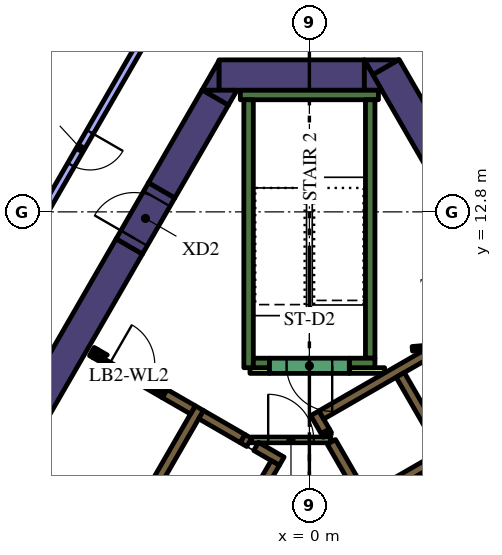
"""IFC4 building model, lengths in metres.
Left out: names, types, materials, properties, quantities, classifications, styles, units other than length and angle.
Written with IfcOpenShell. Run it as: python <this file> out.ifc"""

import sys

from ifc_helpers import new_model, si_unit, direction, frame, frame_2d, origin, place, context, subcontext, project, spatial, polyline, rectangle, outline, extrude, element, fill, save


model = new_model("IFC4")
c1 = context("Model", 3, precision=1e-05, world=origin(), true_north=direction((0.0, 1.0)))
c2 = subcontext(c1, "Body", "Model", "MODEL_VIEW")
j1 = project(units=[si_unit("LENGTHUNIT", "METRE"), si_unit("PLANEANGLEUNIT", "RADIAN")], contexts=[c1])
p1 = place(None, origin())
s1 = spatial("IfcSite", under=j1, at=p1, CompositionType="ELEMENT")
p2 = place(p1, origin())
s2 = spatial("IfcBuilding", under=s1, at=p2, CompositionType="ELEMENT")
p3 = place(p2, frame((0.0, 0.0, 158.4)))
s3 = spatial("IfcBuildingStorey", under=s2, at=p3, CompositionType="ELEMENT", Elevation=158.4)
p4 = place(p3, frame((8.279, 5.761, 0.0), z_axis=(0.0, 0.0, 1.0), x_axis=(-0.500010359015, 0.866019422922, 0.0)))
e1 = element("IfcWall", 1, at=p4, inside=s3, PredefinedType="SOLIDWALL", context=c2, shape_type="SweptSolid", body=[
    extrude(rectangle(XDim=12.528, YDim=0.8, at=frame_2d((6.264, 0.0))), origin(), (0.0, 0.0, 1.0), 4.2),
])
p5 = place(p3, origin())
e2 = element("IfcWall", 2, at=p5, inside=s3, PredefinedType="SOLIDWALL", context=c2, shape_type="SweptSolid", body=[
    extrude(outline(polyline([(1.443, 16.8), (2.339, 16.8), (1.667, 16.412), (1.443, 16.8)])), origin(), (0.0, 0.0, 1.0), 4.2),
])
p6 = place(p3, frame((-2.379, 16.4, 0.0), z_axis=(0.0, 0.0, 1.0), x_axis=(1.0, 0.0, 0.0)))
e3 = element("IfcWall", 3, at=p6, inside=s3, PredefinedType="SOLIDWALL", context=c2, shape_type="SweptSolid", body=[
    extrude(rectangle(XDim=3.824, YDim=0.8, at=frame_2d((1.912, 0.0))), origin(), (0.0, 0.0, 1.0), 4.2),
])
e4 = element("IfcWall", 4, at=p5, inside=s3, PredefinedType="SOLIDWALL", context=c2, shape_type="SweptSolid", body=[
    extrude(outline(polyline([(1.905, 16.0), (1.447, 16.0), (1.447, 16.793), (1.905, 16.0)])), origin(), (0.0, 0.0, 1.0), 4.2),
])
e5 = element("IfcWall", 5, at=p5, inside=s3, PredefinedType="SOLIDWALL", context=c2, shape_type="SweptSolid", body=[
    extrude(outline(polyline([(-2.829, 16.0), (-2.381, 16.776), (-2.381, 16.0), (-2.829, 16.0)])), origin(), (0.0, 0.0, 1.0), 4.2),
])
p7 = place(p3, frame((-2.477, 15.81, 0.0), z_axis=(0.0, 0.0, 1.0), x_axis=(-0.499969377405, -0.866043083026, 0.0)))
e6 = element("IfcWall", 6, at=p7, inside=s3, PredefinedType="SOLIDWALL", context=c2, shape_type="SweptSolid", body=[
    extrude(rectangle(XDim=2.824, YDim=0.8, at=frame_2d((1.412, 0.0))), origin(), (0.0, 0.0, 1.0), 4.2),
])
e7 = element("IfcWall", 7, at=p5, inside=s3, PredefinedType="SOLIDWALL", context=c2, shape_type="SweptSolid", body=[
    extrude(outline(polyline([(-1.905, 16.0), (-2.129, 15.612), (-2.801, 16.0), (-1.905, 16.0)])), origin(), (0.0, 0.0, 1.0), 4.2),
])
p8 = place(p3, frame((-12.668, -1.842, 0.0), z_axis=(0.0, 0.0, 1.0), x_axis=(0.500003640647, 0.866023301845, 0.0)))
e8 = element("IfcWall", 8, at=p8, inside=s3, PredefinedType="SOLIDWALL", context=c2, shape_type="SweptSolid", body=[
    extrude(rectangle(XDim=15.858, YDim=0.8, at=frame_2d((7.929, 0.0))), origin(), (0.0, 0.0, 1.0), 4.2),
])
p9 = place(p3, frame((-1.817, 15.875, 0.0), z_axis=(0.0, 0.0, 1.0), x_axis=(1.0, 0.0, 0.0)))
e9 = element("IfcWall", 9, at=p9, inside=s3, PredefinedType="SOLIDWALL", context=c2, shape_type="SweptSolid", body=[
    extrude(rectangle(XDim=3.634, YDim=0.25, at=frame_2d((1.817, 0.0))), origin(), (0.0, 0.0, 1.0), 4.2),
])
p10 = place(p3, frame((1.6, 8.95, 0.0), z_axis=(0.0, 0.0, 1.0), x_axis=(0.0, 1.0, 0.0)))
e10 = element("IfcWall", 10, at=p10, inside=s3, PredefinedType="SOLIDWALL", context=c2, shape_type="SweptSolid", body=[
    extrude(rectangle(XDim=6.8, YDim=0.25, at=frame_2d((3.4, 0.0))), origin(), (0.0, 0.0, 1.0), 4.2),
])
p11 = place(p3, frame((1.05, 8.825, 0.0), z_axis=(0.0, 0.0, 1.0), x_axis=(1.0, 0.0, 0.0)))
e11 = element("IfcWall", 11, at=p11, inside=s3, PredefinedType="SOLIDWALL", context=c2, shape_type="SweptSolid", body=[
    extrude(rectangle(XDim=0.675, YDim=0.25, at=frame_2d((0.337, 0.0))), origin(), (0.0, 0.0, 1.0), 4.2),
])
p12 = place(p3, frame((-1.6, 8.7, 0.0), z_axis=(0.0, 0.0, 1.0), x_axis=(0.0, 1.0, 0.0)))
e12 = element("IfcWall", 12, at=p12, inside=s3, PredefinedType="SOLIDWALL", context=c2, shape_type="SweptSolid", body=[
    extrude(rectangle(XDim=7.05, YDim=0.25, at=frame_2d((3.525, 0.0))), origin(), (0.0, 0.0, 1.0), 4.2),
])
p13 = place(p3, frame((-1.475, 8.825, 0.0), z_axis=(0.0, 0.0, 1.0), x_axis=(1.0, 0.0, 0.0)))
e13 = element("IfcWall", 13, at=p13, inside=s3, PredefinedType="SOLIDWALL", context=c2, shape_type="SweptSolid", body=[
    extrude(rectangle(XDim=0.425, YDim=0.25, at=frame_2d((0.212, 0.0))), origin(), (0.0, 0.0, 1.0), 4.2),
])
p14 = place(p3, frame((0.473, 6.93, 0.0), z_axis=(0.0, 0.0, 1.0), x_axis=(-0.49972245349, 0.866185586049, 0.0)))
e14 = element("IfcWall", 14, at=p14, inside=s3, PredefinedType="SOLIDWALL", context=c2, shape_type="SweptSolid", body=[
    extrude(rectangle(XDim=0.11, YDim=0.25, at=frame_2d((0.055, 0.0))), origin(), (0.0, 0.0, 1.0), 4.2),
])
p15 = place(p3, frame((6.568, -3.627, 0.0), z_axis=(0.0, 0.0, 1.0), x_axis=(-0.499999455981, 0.866025717874, 0.0)))
e15 = element("IfcWall", 15, at=p15, inside=s3, PredefinedType="SOLIDWALL", context=c2, shape_type="SweptSolid", body=[
    extrude(rectangle(XDim=11.978, YDim=0.25, at=frame_2d((5.989, 0.0))), origin(), (0.0, 0.0, 1.0), 4.2),
])
p16 = place(p3, frame((0.417, 7.027, 0.0), z_axis=(0.0, 0.0, 1.0), x_axis=(-0.500210807569, 0.865903659763, 0.0)))
e16 = element("IfcWall", 16, at=p16, inside=s3, PredefinedType="SOLIDWALL", context=c2, shape_type="SweptSolid", body=[
    extrude(rectangle(XDim=0.548, YDim=0.25, at=frame_2d((0.274, 0.0))), origin(), (0.0, 0.0, 1.0), 4.2),
])
p17 = place(p3, frame((3.1, 9.064, 0.0), z_axis=(0.0, 0.0, 1.0), x_axis=(-0.866030133475, -0.499991807846, 0.0)))
e17 = element("IfcWall", 17, at=p17, inside=s3, PredefinedType="SOLIDWALL", context=c2, shape_type="SweptSolid", body=[
    extrude(rectangle(XDim=3.217, YDim=0.25, at=frame_2d((1.608, 0.0))), origin(), (0.0, 0.0, 1.0), 4.2),
])
p18 = place(p3, frame((1.574, 5.274, 0.0), z_axis=(0.0, 0.0, 1.0), x_axis=(0.866028486751, 0.499994660107, 0.0)))
e18 = element("IfcWall", 18, at=p18, inside=s3, PredefinedType="SOLIDWALL", context=c2, shape_type="SweptSolid", body=[
    extrude(rectangle(XDim=2.2, YDim=0.25, at=frame_2d((1.1, 0.0))), origin(), (0.0, 0.0, 1.0), 4.2),
])
p19 = place(p3, frame((-8.06, -1.311, 0.0), z_axis=(0.0, 0.0, 1.0), x_axis=(0.50000273126, 0.866023826885, 0.0)))
e19 = element("IfcWall", 19, at=p19, inside=s3, PredefinedType="SOLIDWALL", context=c2, shape_type="SweptSolid", body=[
    extrude(rectangle(XDim=10.33, YDim=0.25, at=frame_2d((5.165, 0.0))), origin(), (0.0, 0.0, 1.0), 4.2),
])
p20 = place(p3, frame((-1.758, 6.835, 0.0), z_axis=(0.0, 0.0, 1.0), x_axis=(0.865982457891, -0.500074377092, 0.0)))
e20 = element("IfcWall", 20, at=p20, inside=s3, PredefinedType="SOLIDWALL", context=c2, shape_type="SweptSolid", body=[
    extrude(rectangle(XDim=0.2, YDim=0.25, at=frame_2d((0.1, 0.0))), origin(), (0.0, 0.0, 1.0), 4.2),
])
p21 = place(p3, frame((-1.76, 6.836, 0.0), z_axis=(0.0, 0.0, 1.0), x_axis=(-0.865952863304, 0.500125622755, 0.0)))
e21 = element("IfcWall", 21, at=p21, inside=s3, PredefinedType="SOLIDWALL", context=c2, shape_type="SweptSolid", body=[
    extrude(rectangle(XDim=1.258, YDim=0.25, at=frame_2d((0.629, 0.0))), origin(), (0.0, 0.0, 1.0), 4.2),
])
p22 = place(p3, frame((-0.728, 6.24, 0.0), z_axis=(0.0, 0.0, 1.0), x_axis=(-0.865955664968, 0.500120771724, 0.0)))
e22 = element("IfcWall", 22, at=p22, inside=s3, PredefinedType="SOLIDWALL", context=c2, shape_type="SweptSolid", body=[
    extrude(rectangle(XDim=0.778, YDim=0.25, at=frame_2d((0.389, 0.0))), origin(), (0.0, 0.0, 1.0), 4.2),
])
p23 = place(p3, frame((-5.725, 9.125, 0.0), z_axis=(0.0, 0.0, 1.0), x_axis=(0.866185586049, -0.49972245349, 0.0)))
e23 = element("IfcWall", 23, at=p23, inside=s3, PredefinedType="SOLIDWALL", context=c2, shape_type="SweptSolid", body=[
    extrude(rectangle(XDim=0.11, YDim=0.25, at=frame_2d((0.055, 0.0))), origin(), (0.0, 0.0, 1.0), 4.2),
])
p24 = place(p3, frame((-3.066, 7.59, 0.0), z_axis=(0.0, 0.0, 1.0), x_axis=(-0.866081358704, 0.49990307071, 0.0)))
e24 = element("IfcWall", 24, at=p24, inside=s3, PredefinedType="SOLIDWALL", context=c2, shape_type="SweptSolid", body=[
    extrude(rectangle(XDim=0.858, YDim=0.25, at=frame_2d((0.429, 0.0))), origin(), (0.0, 0.0, 1.0), 4.2),
])
e25 = element("IfcWall", 25, at=p5, inside=s3, PredefinedType="SOLIDWALL", context=c2, shape_type="SweptSolid", body=[
    extrude(outline(polyline([(-3.748, 8.128), (-3.813, 8.015), (-4.027, 8.139), (-4.017, 8.156), (-4.008, 8.173), (-4.0, 8.192), (-3.995, 8.21), (-3.991, 8.23), (-3.99, 8.25), (-3.99, 8.268), (-3.748, 8.128)])), origin(), (0.0, 0.0, 1.0), 4.2),
])
e26 = element("IfcWall", 26, at=p5, inside=s3, PredefinedType="SOLIDWALL", context=c2, shape_type="SweptSolid", body=[
    extrude(outline(polyline([(-5.689, 8.96), (-5.69, 8.961), (-5.565, 9.177), (-5.319, 9.035), (-5.335, 9.026), (-5.351, 9.015), (-5.366, 9.002), (-5.379, 8.988), (-5.392, 8.972), (-5.402, 8.956), (-5.412, 8.939), (-5.629, 9.064), (-5.629, 9.064), (-5.689, 8.96)])), origin(), (0.0, 0.0, 1.0), 4.2),
])
p25 = place(p3, frame((1.05, 8.625, 0.0), z_axis=(0.0, 0.0, 1.0), x_axis=(1.0, 0.0, 0.0)))
e27 = element("IfcWall", 27, at=p25, inside=s3, PredefinedType="PARTITIONING", context=c2, shape_type="SweptSolid", body=[
    extrude(rectangle(XDim=0.929, YDim=0.15, at=frame_2d((0.464, 0.0))), origin(), (0.0, 0.0, 1.0), 3.15),
])
p26 = place(p3, frame((-1.564, 8.625, 0.0), z_axis=(0.0, 0.0, 1.0), x_axis=(1.0, 0.0, 0.0)))
e28 = element("IfcWall", 28, at=p26, inside=s3, PredefinedType="PARTITIONING", context=c2, shape_type="SweptSolid", body=[
    extrude(rectangle(XDim=0.514, YDim=0.15, at=frame_2d((0.257, 0.0))), origin(), (0.0, 0.0, 1.0), 3.15),
])
p27 = place(p3, frame((8.565, -2.185, 0.0), z_axis=(0.0, 0.0, 1.0), x_axis=(-0.499997954832, 0.866026584559, 0.0)))
e29 = element("IfcWall", 29, at=p27, inside=s3, PredefinedType="SOLIDWALL", context=c2, shape_type="SweptSolid", body=[
    extrude(rectangle(XDim=12.35, YDim=0.25, at=frame_2d((6.175, 0.0))), origin(), (0.0, 0.0, 1.0), 4.2),
])
p28 = place(p27, frame((0.585, 0.0, 0.0)))
e30 = element("IfcOpeningElement", 30, at=p28, cuts=e29, PredefinedType="OPENING", context=c2, shape_type="SweptSolid", body=[
    extrude(rectangle(XDim=1.1, YDim=2.1, at=frame_2d((0.55, 1.05))), frame((0.0, 0.135, 0.0), z_axis=(0.0, -1.0, 0.0), x_axis=(1.0, 0.0, 0.0)), (0.0, 0.0, 1.0), 0.27),
])
p29 = place(p3, frame((-0.898, 6.194, 0.0), z_axis=(0.0, 0.0, 1.0), x_axis=(-0.499996202215, -0.866027596426, 0.0)))
e31 = element("IfcWall", 31, at=p29, inside=s3, PredefinedType="SOLIDWALL", context=c2, shape_type="SweptSolid", body=[
    extrude(rectangle(XDim=9.83, YDim=0.25, at=frame_2d((4.915, 0.0))), origin(), (0.0, 0.0, 1.0), 4.2),
])
p30 = place(p29, frame((0.585, 0.0, 0.0)))
e32 = element("IfcOpeningElement", 32, at=p30, cuts=e31, PredefinedType="OPENING", context=c2, shape_type="SweptSolid", body=[
    extrude(rectangle(XDim=1.1, YDim=2.1, at=frame_2d((0.55, 1.05))), frame((0.0, 0.135, 0.0), z_axis=(0.0, -1.0, 0.0), x_axis=(1.0, 0.0, 0.0)), (0.0, 0.0, 1.0), 0.27),
])
p31 = place(p29, frame((3.105, 0.0, 0.0)))
e33 = element("IfcOpeningElement", 33, at=p31, cuts=e31, PredefinedType="OPENING", context=c2, shape_type="SweptSolid", body=[
    extrude(rectangle(XDim=1.1, YDim=2.1, at=frame_2d((0.55, 1.05))), frame((0.0, 0.135, 0.0), z_axis=(0.0, -1.0, 0.0), x_axis=(1.0, 0.0, 0.0)), (0.0, 0.0, 1.0), 0.27),
])
p32 = place(p29, frame((5.625, 0.0, 0.0)))
e34 = element("IfcOpeningElement", 34, at=p32, cuts=e31, PredefinedType="OPENING", context=c2, shape_type="SweptSolid", body=[
    extrude(rectangle(XDim=1.1, YDim=2.1, at=frame_2d((0.55, 1.05))), frame((0.0, 0.135, 0.0), z_axis=(0.0, -1.0, 0.0), x_axis=(1.0, 0.0, 0.0)), (0.0, 0.0, 1.0), 0.27),
])
p33 = place(p29, frame((8.145, 0.0, 0.0)))
e35 = element("IfcOpeningElement", 35, at=p33, cuts=e31, PredefinedType="OPENING", context=c2, shape_type="SweptSolid", body=[
    extrude(rectangle(XDim=1.1, YDim=2.1, at=frame_2d((0.55, 1.05))), frame((0.0, 0.135, 0.0), z_axis=(0.0, -1.0, 0.0), x_axis=(1.0, 0.0, 0.0)), (0.0, 0.0, 1.0), 0.27),
])
p34 = place(p3, frame((1.05, 8.75, 0.0), z_axis=(0.0, 0.0, 1.0), x_axis=(-1.0, 0.0, 0.0)))
e36 = element("IfcWall", 36, at=p34, inside=s3, PredefinedType="SOLIDWALL", context=c2, shape_type="SweptSolid", body=[
    extrude(rectangle(XDim=2.1, YDim=0.4, at=frame_2d((1.05, 0.0))), origin(), (0.0, 0.0, 1.0), 4.2),
])
p35 = place(p34, frame((0.45, 0.0, 0.0)))
e37 = element("IfcOpeningElement", 37, at=p35, cuts=e36, PredefinedType="OPENING", context=c2, shape_type="SweptSolid", body=[
    extrude(rectangle(XDim=1.2, YDim=2.1, at=frame_2d((0.6, 1.05))), frame((0.0, 0.21, 0.0), z_axis=(0.0, -1.0, 0.0), x_axis=(1.0, 0.0, 0.0)), (0.0, 0.0, 1.0), 0.42),
])
p36 = place(p3, frame((5.398, 9.419, 0.0), z_axis=(0.0, 0.0, 1.0), x_axis=(-0.996653416376, -0.081743303248, 0.0)))
e38 = element("IfcWall", 38, at=p36, inside=s3, PredefinedType="PARTITIONING", context=c2, shape_type="SweptSolid", body=[
    extrude(rectangle(XDim=2.7, YDim=0.12, at=frame_2d((1.35, 0.0))), origin(), (0.0, 0.0, 1.0), 3.15),
])
p37 = place(p36, frame((1.45, 0.0, 0.0)))
e39 = element("IfcOpeningElement", 39, at=p37, cuts=e38, PredefinedType="OPENING", context=c2, shape_type="SweptSolid", body=[
    extrude(rectangle(XDim=0.9, YDim=2.1, at=frame_2d((0.45, 1.05))), frame((0.0, 0.07, 0.0), z_axis=(0.0, -1.0, 0.0), x_axis=(1.0, 0.0, 0.0)), (0.0, 0.0, 1.0), 0.14),
])
p38 = place(p3, frame((-1.534, 6.8, 0.0), z_axis=(0.0, 0.0, 1.0), x_axis=(1.0, 0.0, 0.0)))
e40 = element("IfcWall", 40, at=p38, inside=s3, PredefinedType="PARTITIONING", context=c2, shape_type="SweptSolid", body=[
    extrude(rectangle(XDim=2.1, YDim=0.15, at=frame_2d((1.05, 0.0))), origin(), (0.0, 0.0, 1.0), 3.15),
])
p39 = place(p38, frame((0.45, 0.0, 0.0)))
e41 = element("IfcOpeningElement", 41, at=p39, cuts=e40, PredefinedType="OPENING", context=c2, shape_type="SweptSolid", body=[
    extrude(rectangle(XDim=1.2, YDim=2.1, at=frame_2d((0.6, 1.05))), frame((0.0, 0.085, 0.0), z_axis=(0.0, -1.0, 0.0), x_axis=(1.0, 0.0, 0.0)), (0.0, 0.0, 1.0), 0.17),
])
p40 = place(p3, frame((-5.659, 9.012, 0.0), z_axis=(0.0, 0.0, 1.0), x_axis=(0.866009402589, -0.500027713859, 0.0)))
e42 = element("IfcWall", 42, at=p40, inside=s3, PredefinedType="PARTITIONING", context=c2, shape_type="SweptSolid", body=[
    extrude(rectangle(XDim=2.1, YDim=0.12, at=frame_2d((1.05, 0.0))), origin(), (0.0, 0.0, 1.0), 3.15),
])
p41 = place(p40, frame((0.45, 0.0, 0.0)))
e43 = element("IfcOpeningElement", 43, at=p41, cuts=e42, PredefinedType="OPENING", context=c2, shape_type="SweptSolid", body=[
    extrude(rectangle(XDim=1.2, YDim=2.1, at=frame_2d((0.6, 1.05))), frame((0.0, 0.07, 0.0), z_axis=(0.0, -1.0, 0.0), x_axis=(1.0, 0.0, 0.0)), (0.0, 0.0, 1.0), 0.14),
])
p42 = place(p3, frame((-4.739, 11.892, 0.0), z_axis=(0.0, 0.0, 1.0), x_axis=(0.500062241894, 0.865989465428, 0.0)))
e44 = element("IfcWall", 44, at=p42, inside=s3, PredefinedType="SOLIDWALL", context=c2, shape_type="SweptSolid", body=[
    extrude(rectangle(XDim=1.7, YDim=0.8, at=frame_2d((0.85, 0.0))), origin(), (0.0, 0.0, 1.0), 4.2),
])
p43 = place(p42, frame((0.25, 0.0, 0.0)))
e45 = element("IfcOpeningElement", 45, at=p43, cuts=e44, PredefinedType="OPENING", context=c2, shape_type="SweptSolid", body=[
    extrude(rectangle(XDim=1.2, YDim=2.1, at=frame_2d((0.6, 1.05))), frame((0.0, 0.41, 0.0), z_axis=(0.0, -1.0, 0.0), x_axis=(1.0, 0.0, 0.0)), (0.0, 0.0, 1.0), 0.82),
])
p44 = place(p3, frame((-9.322, 16.573, 0.0), z_axis=(0.0, 0.0, 1.0), x_axis=(0.551906048292, 0.833906298009, 0.0)))
e46 = element("IfcWall", 46, at=p44, inside=s3, PredefinedType="PARTITIONING", context=c2, shape_type="SweptSolid", body=[
    extrude(rectangle(XDim=5.995, YDim=0.15, at=frame_2d((2.998, 0.0))), origin(), (0.0, 0.0, 1.0), 3.15),
])
p45 = place(p44, frame((2.595, 0.0, 0.0)))
e47 = element("IfcOpeningElement", 47, at=p45, cuts=e46, PredefinedType="OPENING", context=c2, shape_type="SweptSolid", body=[
    extrude(rectangle(XDim=0.9, YDim=2.1, at=frame_2d((0.45, 1.05))), frame((0.0, 0.085, 0.0), z_axis=(0.0, -1.0, 0.0), x_axis=(1.0, 0.0, 0.0)), (0.0, 0.0, 1.0), 0.17),
])
p46 = place(p3, frame((-3.522, 18.8, 0.0), z_axis=(0.0, 0.0, 1.0), x_axis=(-0.500015783377, -0.866016291056, 0.0)))
e48 = element("IfcWall", 48, at=p46, inside=s3, PredefinedType="PARTITIONING", context=c2, shape_type="SweptSolid", body=[
    extrude(rectangle(XDim=9.99, YDim=0.2, at=frame_2d((4.995, 0.0))), origin(), (0.0, 0.0, 1.0), 3.15),
])
p47 = place(p46, frame((4.5, 0.0, 0.0)))
e49 = element("IfcOpeningElement", 49, at=p47, cuts=e48, PredefinedType="OPENING", context=c2, shape_type="SweptSolid", body=[
    extrude(rectangle(XDim=1.0, YDim=2.1, at=frame_2d((0.5, 1.05))), frame((0.0, 0.11, 0.0), z_axis=(0.0, -1.0, 0.0), x_axis=(1.0, 0.0, 0.0)), (0.0, 0.0, 1.0), 0.22),
])
p48 = place(p35, origin())
e50 = element("IfcDoor", 50, at=p48, inside=s3, OperationType="SINGLE_SWING_LEFT", PredefinedType="DOOR", context=c2, shape_type="SweptSolid", body=[
    extrude(rectangle(XDim=1.2, YDim=2.1, at=frame_2d((0.6, 1.05))), frame((0.0, 0.025, 0.0), z_axis=(0.0, -1.0, 0.0), x_axis=(1.0, 0.0, 0.0)), (0.0, 0.0, 1.0), 0.05),
])
fill(e37, e50)
p49 = place(p39, origin())
e51 = element("IfcDoor", 51, at=p49, inside=s3, OperationType="SINGLE_SWING_LEFT", PredefinedType="DOOR", context=c2, shape_type="SweptSolid", body=[
    extrude(rectangle(XDim=1.2, YDim=2.1, at=frame_2d((0.6, 1.05))), frame((0.0, 0.025, 0.0), z_axis=(0.0, -1.0, 0.0), x_axis=(1.0, 0.0, 0.0)), (0.0, 0.0, 1.0), 0.05),
])
fill(e41, e51)
p50 = place(p41, origin())
e52 = element("IfcDoor", 52, at=p50, inside=s3, OperationType="SINGLE_SWING_LEFT", PredefinedType="DOOR", context=c2, shape_type="SweptSolid", body=[
    extrude(rectangle(XDim=1.2, YDim=2.1, at=frame_2d((0.6, 1.05))), frame((0.0, 0.025, 0.0), z_axis=(0.0, -1.0, 0.0), x_axis=(1.0, 0.0, 0.0)), (0.0, 0.0, 1.0), 0.05),
])
fill(e43, e52)
p51 = place(p43, origin())
e53 = element("IfcDoor", 53, at=p51, inside=s3, OperationType="SINGLE_SWING_LEFT", PredefinedType="DOOR", context=c2, shape_type="SweptSolid", body=[
    extrude(rectangle(XDim=1.2, YDim=2.1, at=frame_2d((0.6, 1.05))), frame((0.0, 0.025, 0.0), z_axis=(0.0, -1.0, 0.0), x_axis=(1.0, 0.0, 0.0)), (0.0, 0.0, 1.0), 0.05),
])
fill(e45, e53)
p52 = place(p47, origin())
e54 = element("IfcDoor", 54, at=p52, inside=s3, OperationType="SINGLE_SWING_RIGHT", PredefinedType="DOOR", context=c2, shape_type="SweptSolid", body=[
    extrude(rectangle(XDim=1.0, YDim=2.1, at=frame_2d((0.5, 1.05))), frame((0.0, 0.025, 0.0), z_axis=(0.0, -1.0, 0.0), x_axis=(1.0, 0.0, 0.0)), (0.0, 0.0, 1.0), 0.05),
])
fill(e49, e54)
save(model, sys.argv[1])
